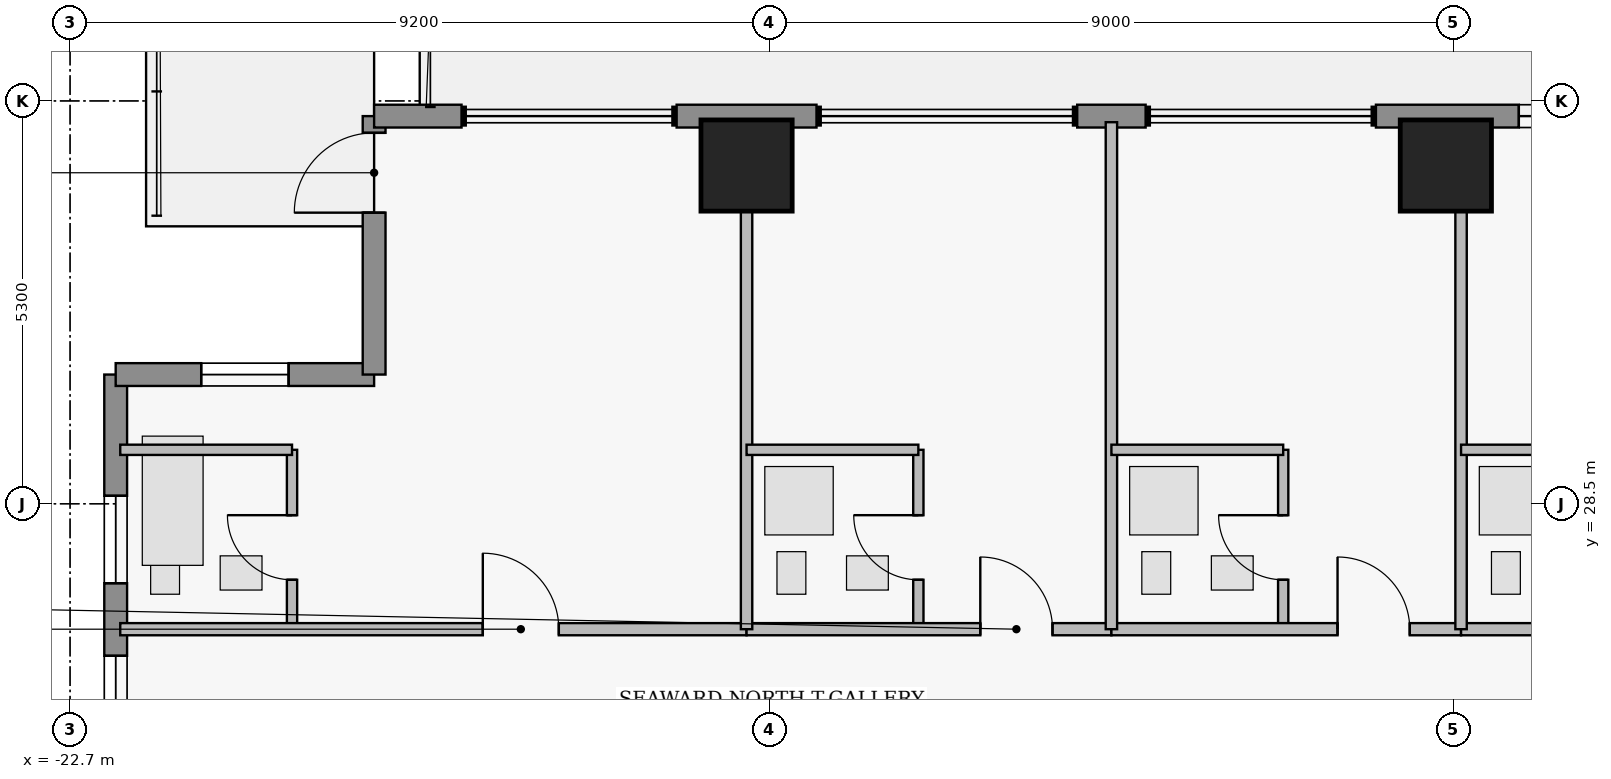
"""IFC4 building model, lengths in metres.
Left out: names, types, materials, properties, quantities, classifications, styles, units other than length and angle.
Written with IfcOpenShell. Run it as: python <this file> out.ifc"""

import sys

from ifc_helpers import new_model, si_unit, direction, frame, frame_2d, origin, origin_2d, place, context, subcontext, project, spatial, rectangle, extrude, element, fill, save


model = new_model("IFC4")
c1 = context("Model", 3, precision=1e-05, world=origin(), true_north=direction((0.0, 1.0)))
c2 = subcontext(c1, "Body", "Model", "MODEL_VIEW")
j1 = project(units=[si_unit("LENGTHUNIT", "METRE"), si_unit("PLANEANGLEUNIT", "RADIAN")], contexts=[c1])
p1 = place(None, origin())
s1 = spatial("IfcSite", under=j1, at=p1, CompositionType="ELEMENT")
p2 = place(p1, origin())
s2 = spatial("IfcBuilding", under=s1, at=p2, CompositionType="ELEMENT")
p3 = place(p2, frame((0.0, 0.0, 222.4)))
s3 = spatial("IfcBuildingStorey", under=s2, at=p3, CompositionType="ELEMENT", Elevation=222.4)
for number, where, z_axis, x_axis in (
    (1, (-13.8, 32.95, 0.0), (0.0, 0.0, 1.0), (1.0, 0.0, 0.0)),
    (2, (-4.6, 32.95, 0.0), (0.0, 0.0, 1.0), (1.0, 0.0, 0.0)),
):
    element("IfcColumn", number, at=place(p3, frame(where, z_axis=z_axis, x_axis=x_axis)), inside=s3, PredefinedType="COLUMN", context=c2, shape_type="SweptSolid", body=[
        extrude(rectangle(XDim=1.2, YDim=1.2, at=origin_2d()), origin(), (0.0, 0.0, 1.0), 3.75),
    ])
p4 = place(p3, frame((-22.1, 24.55, 0.0), z_axis=(0.0, 0.0, 1.0), x_axis=(0.0, 1.0, 0.0)))
e3 = element("IfcWall", 3, at=p4, inside=s3, PredefinedType="STANDARD", context=c2, shape_type="SweptSolid", body=[
    extrude(rectangle(XDim=5.65, YDim=0.3, at=frame_2d((2.825, 0.0))), origin(), (0.0, 0.0, 1.0), 3.53),
])
p5 = place(p4, frame((0.8, 0.0, 0.95)))
e4 = element("IfcOpeningElement", 4, at=p5, cuts=e3, PredefinedType="OPENING", context=c2, shape_type="SweptSolid", body=[
    extrude(rectangle(XDim=1.15, YDim=1.55, at=frame_2d((0.575, 0.775))), frame((0.0, 0.16, 0.0), z_axis=(0.0, -1.0, 0.0), x_axis=(1.0, 0.0, 0.0)), (0.0, 0.0, 1.0), 0.32),
])
p6 = place(p4, frame((2.905, 0.0, 0.95)))
e5 = element("IfcOpeningElement", 5, at=p6, cuts=e3, PredefinedType="OPENING", context=c2, shape_type="SweptSolid", body=[
    extrude(rectangle(XDim=1.15, YDim=1.55, at=frame_2d((0.575, 0.775))), frame((0.0, 0.16, 0.0), z_axis=(0.0, -1.0, 0.0), x_axis=(1.0, 0.0, 0.0)), (0.0, 0.0, 1.0), 0.32),
])
p7 = place(p3, frame((-22.1, 30.2, 0.0), z_axis=(0.0, 0.0, 1.0), x_axis=(1.0, 0.0, 0.0)))
e6 = element("IfcWall", 6, at=p7, inside=s3, PredefinedType="STANDARD", context=c2, shape_type="SweptSolid", body=[
    extrude(rectangle(XDim=3.4, YDim=0.3, at=frame_2d((1.7, 0.0))), origin(), (0.0, 0.0, 1.0), 3.53),
])
p8 = place(p7, frame((1.125, 0.0, 1.25)))
e7 = element("IfcOpeningElement", 7, at=p8, cuts=e6, PredefinedType="OPENING", context=c2, shape_type="SweptSolid", body=[
    extrude(rectangle(XDim=1.15, YDim=1.55, at=frame_2d((0.575, 0.775))), frame((0.0, 0.16, 0.0), z_axis=(0.0, -1.0, 0.0), x_axis=(1.0, 0.0, 0.0)), (0.0, 0.0, 1.0), 0.32),
])
p9 = place(p3, frame((-18.7, 30.2, 0.0), z_axis=(0.0, 0.0, 1.0), x_axis=(0.0, 1.0, 0.0)))
e8 = element("IfcWall", 8, at=p9, inside=s3, PredefinedType="STANDARD", context=c2, shape_type="SweptSolid", body=[
    extrude(rectangle(XDim=3.4, YDim=0.3, at=frame_2d((1.7, 0.0))), origin(), (0.0, 0.0, 1.0), 3.53),
])
p10 = place(p9, frame((2.13, 0.0, 0.0)))
e9 = element("IfcOpeningElement", 9, at=p10, cuts=e8, PredefinedType="OPENING", context=c2, shape_type="SweptSolid", body=[
    extrude(rectangle(XDim=1.05, YDim=2.2, at=frame_2d((0.525, 1.1))), frame((0.0, 0.16, 0.0), z_axis=(0.0, -1.0, 0.0), x_axis=(1.0, 0.0, 0.0)), (0.0, 0.0, 1.0), 0.32),
])
p11 = place(p3, frame((-18.7, 33.6, 0.0), z_axis=(0.0, 0.0, 1.0), x_axis=(1.0, 0.0, 0.0)))
e10 = element("IfcWall", 10, at=p11, inside=s3, PredefinedType="STANDARD", context=c2, shape_type="SweptSolid", body=[
    extrude(rectangle(XDim=1.15, YDim=0.3, at=frame_2d((0.575, 0.0))), origin(), (0.0, 0.0, 1.0), 3.53),
])
p12 = place(p3, frame((-14.72, 33.6, 0.0), z_axis=(0.0, 0.0, 1.0), x_axis=(1.0, 0.0, 0.0)))
e11 = element("IfcWall", 11, at=p12, inside=s3, PredefinedType="STANDARD", context=c2, shape_type="SweptSolid", body=[
    extrude(rectangle(XDim=1.84, YDim=0.3, at=frame_2d((0.92, 0.0))), origin(), (0.0, 0.0, 1.0), 3.53),
])
p13 = place(p3, frame((-9.45, 33.6, 0.0), z_axis=(0.0, 0.0, 1.0), x_axis=(1.0, 0.0, 0.0)))
e12 = element("IfcWall", 12, at=p13, inside=s3, PredefinedType="STANDARD", context=c2, shape_type="SweptSolid", body=[
    extrude(rectangle(XDim=0.9, YDim=0.3, at=frame_2d((0.45, 0.0))), origin(), (0.0, 0.0, 1.0), 3.53),
])
p14 = place(p3, frame((-5.52, 33.6, 0.0), z_axis=(0.0, 0.0, 1.0), x_axis=(1.0, 0.0, 0.0)))
e13 = element("IfcWall", 13, at=p14, inside=s3, PredefinedType="STANDARD", context=c2, shape_type="SweptSolid", body=[
    extrude(rectangle(XDim=6.17, YDim=0.3, at=frame_2d((3.085, 0.0))), origin(), (0.0, 0.0, 1.0), 3.53),
])
p15 = place(p14, frame((3.54, 0.0, 0.85)))
e14 = element("IfcOpeningElement", 14, at=p15, cuts=e13, PredefinedType="OPENING", context=c2, shape_type="SweptSolid", body=[
    extrude(rectangle(XDim=1.6, YDim=1.8, at=frame_2d((0.8, 0.9))), frame((0.0, 0.16, 0.0), z_axis=(0.0, -1.0, 0.0), x_axis=(1.0, 0.0, 0.0)), (0.0, 0.0, 1.0), 0.32),
])
p16 = place(p14, frame((1.88, 0.0, 0.95)))
e15 = element("IfcOpeningElement", 15, at=p16, cuts=e13, PredefinedType="OPENING", context=c2, shape_type="SweptSolid", body=[
    extrude(rectangle(XDim=1.15, YDim=1.55, at=frame_2d((0.575, 0.775))), frame((0.0, 0.16, 0.0), z_axis=(0.0, -1.0, 0.0), x_axis=(1.0, 0.0, 0.0)), (0.0, 0.0, 1.0), 0.32),
])
p17 = place(p3, frame((-19.78, 26.85, 0.0), z_axis=(0.0, 0.0, 1.0), x_axis=(0.0, 1.0, 0.0)))
e16 = element("IfcWall", 16, at=p17, inside=s3, PredefinedType="PLUMBINGWALL", context=c2, shape_type="SweptSolid", body=[
    extrude(rectangle(XDim=2.36, YDim=0.135, at=frame_2d((1.18, 0.0))), origin(), (0.0, 0.0, 1.0), 3.53),
])
p18 = place(p17, frame((0.65, 0.0, 0.0)))
e17 = element("IfcOpeningElement", 17, at=p18, cuts=e16, PredefinedType="OPENING", context=c2, shape_type="SweptSolid", body=[
    extrude(rectangle(XDim=0.85, YDim=2.1, at=frame_2d((0.425, 1.05))), frame((0.0, 0.077, 0.0), z_axis=(0.0, -1.0, 0.0), x_axis=(1.0, 0.0, 0.0)), (0.0, 0.0, 1.0), 0.155),
])
p19 = place(p3, frame((-22.04, 26.85, 0.0), z_axis=(0.0, 0.0, 1.0), x_axis=(1.0, 0.0, 0.0)))
e18 = element("IfcWall", 18, at=p19, inside=s3, PredefinedType="PARTITIONING", context=c2, shape_type="SweptSolid", body=[
    extrude(rectangle(XDim=8.24, YDim=0.16, at=frame_2d((4.12, 0.0))), origin(), (0.0, 0.0, 1.0), 3.53),
])
p20 = place(p19, frame((4.77, 0.0, 0.0)))
e19 = element("IfcOpeningElement", 19, at=p20, cuts=e18, PredefinedType="OPENING", context=c2, shape_type="SweptSolid", body=[
    extrude(rectangle(XDim=1.0, YDim=2.15, at=frame_2d((0.5, 1.075))), frame((0.0, 0.09, 0.0), z_axis=(0.0, -1.0, 0.0), x_axis=(1.0, 0.0, 0.0)), (0.0, 0.0, 1.0), 0.18),
])
p21 = place(p3, frame((-11.54, 26.85, 0.0), z_axis=(0.0, 0.0, 1.0), x_axis=(0.0, 1.0, 0.0)))
e20 = element("IfcWall", 20, at=p21, inside=s3, PredefinedType="PLUMBINGWALL", context=c2, shape_type="SweptSolid", body=[
    extrude(rectangle(XDim=2.36, YDim=0.135, at=frame_2d((1.18, 0.0))), origin(), (0.0, 0.0, 1.0), 3.53),
])
p22 = place(p21, frame((0.65, 0.0, 0.0)))
e21 = element("IfcOpeningElement", 21, at=p22, cuts=e20, PredefinedType="OPENING", context=c2, shape_type="SweptSolid", body=[
    extrude(rectangle(XDim=0.85, YDim=2.1, at=frame_2d((0.425, 1.05))), frame((0.0, 0.077, 0.0), z_axis=(0.0, -1.0, 0.0), x_axis=(1.0, 0.0, 0.0)), (0.0, 0.0, 1.0), 0.155),
])
p23 = place(p3, frame((-13.8, 26.85, 0.0), z_axis=(0.0, 0.0, 1.0), x_axis=(1.0, 0.0, 0.0)))
e22 = element("IfcWall", 22, at=p23, inside=s3, PredefinedType="PARTITIONING", context=c2, shape_type="SweptSolid", body=[
    extrude(rectangle(XDim=4.8, YDim=0.16, at=frame_2d((2.4, 0.0))), origin(), (0.0, 0.0, 1.0), 3.53),
])
p24 = place(p23, frame((3.075, 0.0, 0.0)))
e23 = element("IfcOpeningElement", 23, at=p24, cuts=e22, PredefinedType="OPENING", context=c2, shape_type="SweptSolid", body=[
    extrude(rectangle(XDim=0.95, YDim=2.15, at=frame_2d((0.475, 1.075))), frame((0.0, 0.09, 0.0), z_axis=(0.0, -1.0, 0.0), x_axis=(1.0, 0.0, 0.0)), (0.0, 0.0, 1.0), 0.18),
])
p25 = place(p3, frame((-6.74, 26.85, 0.0), z_axis=(0.0, 0.0, 1.0), x_axis=(0.0, 1.0, 0.0)))
e24 = element("IfcWall", 24, at=p25, inside=s3, PredefinedType="PLUMBINGWALL", context=c2, shape_type="SweptSolid", body=[
    extrude(rectangle(XDim=2.36, YDim=0.135, at=frame_2d((1.18, 0.0))), origin(), (0.0, 0.0, 1.0), 3.53),
])
p26 = place(p25, frame((0.65, 0.0, 0.0)))
e25 = element("IfcOpeningElement", 25, at=p26, cuts=e24, PredefinedType="OPENING", context=c2, shape_type="SweptSolid", body=[
    extrude(rectangle(XDim=0.85, YDim=2.1, at=frame_2d((0.425, 1.05))), frame((0.0, 0.077, 0.0), z_axis=(0.0, -1.0, 0.0), x_axis=(1.0, 0.0, 0.0)), (0.0, 0.0, 1.0), 0.155),
])
p27 = place(p3, frame((-9.0, 26.85, 0.0), z_axis=(0.0, 0.0, 1.0), x_axis=(1.0, 0.0, 0.0)))
e26 = element("IfcWall", 26, at=p27, inside=s3, PredefinedType="PARTITIONING", context=c2, shape_type="SweptSolid", body=[
    extrude(rectangle(XDim=4.6, YDim=0.16, at=frame_2d((2.3, 0.0))), origin(), (0.0, 0.0, 1.0), 3.53),
])
p28 = place(p27, frame((2.975, 0.0, 0.0)))
e27 = element("IfcOpeningElement", 27, at=p28, cuts=e26, PredefinedType="OPENING", context=c2, shape_type="SweptSolid", body=[
    extrude(rectangle(XDim=0.95, YDim=2.15, at=frame_2d((0.475, 1.075))), frame((0.0, 0.09, 0.0), z_axis=(0.0, -1.0, 0.0), x_axis=(1.0, 0.0, 0.0)), (0.0, 0.0, 1.0), 0.18),
])
p29 = place(p3, frame((-4.4, 26.85, 0.0), z_axis=(0.0, 0.0, 1.0), x_axis=(1.0, 0.0, 0.0)))
e28 = element("IfcWall", 28, at=p29, inside=s3, PredefinedType="PARTITIONING", context=c2, shape_type="SweptSolid", body=[
    extrude(rectangle(XDim=4.6, YDim=0.16, at=frame_2d((2.3, 0.0))), origin(), (0.0, 0.0, 1.0), 3.53),
])
p30 = place(p29, frame((2.975, 0.0, 0.0)))
e29 = element("IfcOpeningElement", 29, at=p30, cuts=e28, PredefinedType="OPENING", context=c2, shape_type="SweptSolid", body=[
    extrude(rectangle(XDim=0.95, YDim=2.15, at=frame_2d((0.475, 1.075))), frame((0.0, 0.09, 0.0), z_axis=(0.0, -1.0, 0.0), x_axis=(1.0, 0.0, 0.0)), (0.0, 0.0, 1.0), 0.18),
])
p31 = place(p3, frame((-22.04, 29.21, 0.0), z_axis=(0.0, 0.0, 1.0), x_axis=(1.0, 0.0, 0.0)))
e30 = element("IfcWall", 30, at=p31, inside=s3, PredefinedType="PLUMBINGWALL", context=c2, shape_type="SweptSolid", body=[
    extrude(rectangle(XDim=2.26, YDim=0.135, at=frame_2d((1.13, 0.0))), origin(), (0.0, 0.0, 1.0), 3.53),
])
p32 = place(p3, frame((-13.8, 26.85, 0.0), z_axis=(0.0, 0.0, 1.0), x_axis=(0.0, 1.0, 0.0)))
e31 = element("IfcWall", 31, at=p32, inside=s3, PredefinedType="PARTITIONING", context=c2, shape_type="SweptSolid", body=[
    extrude(rectangle(XDim=6.67, YDim=0.15, at=frame_2d((3.335, 0.0))), origin(), (0.0, 0.0, 1.0), 2.519),
])
p33 = place(p3, frame((-13.8, 29.21, 0.0), z_axis=(0.0, 0.0, 1.0), x_axis=(1.0, 0.0, 0.0)))
e32 = element("IfcWall", 32, at=p33, inside=s3, PredefinedType="PLUMBINGWALL", context=c2, shape_type="SweptSolid", body=[
    extrude(rectangle(XDim=2.26, YDim=0.135, at=frame_2d((1.13, 0.0))), origin(), (0.0, 0.0, 1.0), 3.53),
])
p34 = place(p3, frame((-9.0, 26.85, 0.0), z_axis=(0.0, 0.0, 1.0), x_axis=(0.0, 1.0, 0.0)))
e33 = element("IfcWall", 33, at=p34, inside=s3, PredefinedType="PARTITIONING", context=c2, shape_type="SweptSolid", body=[
    extrude(rectangle(XDim=6.67, YDim=0.15, at=frame_2d((3.335, 0.0))), origin(), (0.0, 0.0, 1.0), 3.53),
])
p35 = place(p3, frame((-9.0, 29.21, 0.0), z_axis=(0.0, 0.0, 1.0), x_axis=(1.0, 0.0, 0.0)))
e34 = element("IfcWall", 34, at=p35, inside=s3, PredefinedType="PLUMBINGWALL", context=c2, shape_type="SweptSolid", body=[
    extrude(rectangle(XDim=2.26, YDim=0.135, at=frame_2d((1.13, 0.0))), origin(), (0.0, 0.0, 1.0), 3.53),
])
p36 = place(p3, frame((-4.4, 26.85, 0.0), z_axis=(0.0, 0.0, 1.0), x_axis=(0.0, 1.0, 0.0)))
e35 = element("IfcWall", 35, at=p36, inside=s3, PredefinedType="PARTITIONING", context=c2, shape_type="SweptSolid", body=[
    extrude(rectangle(XDim=6.67, YDim=0.15, at=frame_2d((3.335, 0.0))), origin(), (0.0, 0.0, 1.0), 2.519),
])
p37 = place(p3, frame((-4.4, 29.21, 0.0), z_axis=(0.0, 0.0, 1.0), x_axis=(1.0, 0.0, 0.0)))
e36 = element("IfcWall", 36, at=p37, inside=s3, PredefinedType="PLUMBINGWALL", context=c2, shape_type="SweptSolid", body=[
    extrude(rectangle(XDim=2.26, YDim=0.135, at=frame_2d((1.13, 0.0))), origin(), (0.0, 0.0, 1.0), 3.53),
])
p38 = place(p5, origin())
e37 = element("IfcWindow", 37, at=p38, inside=s3, PartitioningType="SINGLE_PANEL", PredefinedType="WINDOW", context=c2, shape_type="SweptSolid", body=[
    extrude(rectangle(XDim=1.15, YDim=1.55, at=frame_2d((0.575, 0.775))), frame((0.0, 0.03, 0.0), z_axis=(0.0, -1.0, 0.0), x_axis=(1.0, 0.0, 0.0)), (0.0, 0.0, 1.0), 0.06),
])
fill(e4, e37)
p39 = place(p6, origin())
e38 = element("IfcWindow", 38, at=p39, inside=s3, PartitioningType="SINGLE_PANEL", PredefinedType="WINDOW", context=c2, shape_type="SweptSolid", body=[
    extrude(rectangle(XDim=1.15, YDim=1.55, at=frame_2d((0.575, 0.775))), frame((0.0, 0.03, 0.0), z_axis=(0.0, -1.0, 0.0), x_axis=(1.0, 0.0, 0.0)), (0.0, 0.0, 1.0), 0.06),
])
fill(e5, e38)
p40 = place(p8, origin())
e39 = element("IfcWindow", 39, at=p40, inside=s3, PartitioningType="SINGLE_PANEL", PredefinedType="WINDOW", context=c2, shape_type="SweptSolid", body=[
    extrude(rectangle(XDim=1.15, YDim=1.55, at=frame_2d((0.575, 0.775))), frame((0.0, 0.03, 0.0), z_axis=(0.0, -1.0, 0.0), x_axis=(1.0, 0.0, 0.0)), (0.0, 0.0, 1.0), 0.06),
])
fill(e7, e39)
p41 = place(p10, origin())
e40 = element("IfcDoor", 40, at=p41, inside=s3, OperationType="SINGLE_SWING_LEFT", PredefinedType="DOOR", context=c2, shape_type="SweptSolid", body=[
    extrude(rectangle(XDim=1.05, YDim=2.2, at=frame_2d((0.525, 1.1))), frame((0.0, 0.025, 0.0), z_axis=(0.0, -1.0, 0.0), x_axis=(1.0, 0.0, 0.0)), (0.0, 0.0, 1.0), 0.05),
])
fill(e9, e40)
p42 = place(p16, origin())
e41 = element("IfcWindow", 41, at=p42, inside=s3, PartitioningType="SINGLE_PANEL", PredefinedType="WINDOW", context=c2, shape_type="SweptSolid", body=[
    extrude(rectangle(XDim=1.15, YDim=1.55, at=frame_2d((0.575, 0.775))), frame((0.0, 0.03, 0.0), z_axis=(0.0, -1.0, 0.0), x_axis=(1.0, 0.0, 0.0)), (0.0, 0.0, 1.0), 0.06),
])
fill(e15, e41)
p43 = place(p18, origin())
e42 = element("IfcDoor", 42, at=p43, inside=s3, OperationType="SINGLE_SWING_RIGHT", PredefinedType="DOOR", context=c2, shape_type="SweptSolid", body=[
    extrude(rectangle(XDim=0.85, YDim=2.1, at=frame_2d((0.425, 1.05))), frame((0.0, 0.025, 0.0), z_axis=(0.0, -1.0, 0.0), x_axis=(1.0, 0.0, 0.0)), (0.0, 0.0, 1.0), 0.05),
])
fill(e17, e42)
p44 = place(p20, origin())
e43 = element("IfcDoor", 43, at=p44, inside=s3, OperationType="SINGLE_SWING_LEFT", PredefinedType="DOOR", context=c2, shape_type="SweptSolid", body=[
    extrude(rectangle(XDim=1.0, YDim=2.15, at=frame_2d((0.5, 1.075))), frame((0.0, 0.025, 0.0), z_axis=(0.0, -1.0, 0.0), x_axis=(1.0, 0.0, 0.0)), (0.0, 0.0, 1.0), 0.05),
])
fill(e19, e43)
p45 = place(p22, origin())
e44 = element("IfcDoor", 44, at=p45, inside=s3, OperationType="SINGLE_SWING_RIGHT", PredefinedType="DOOR", context=c2, shape_type="SweptSolid", body=[
    extrude(rectangle(XDim=0.85, YDim=2.1, at=frame_2d((0.425, 1.05))), frame((0.0, 0.025, 0.0), z_axis=(0.0, -1.0, 0.0), x_axis=(1.0, 0.0, 0.0)), (0.0, 0.0, 1.0), 0.05),
])
fill(e21, e44)
p46 = place(p24, origin())
e45 = element("IfcDoor", 45, at=p46, inside=s3, OperationType="SINGLE_SWING_LEFT", PredefinedType="DOOR", context=c2, shape_type="SweptSolid", body=[
    extrude(rectangle(XDim=0.95, YDim=2.15, at=frame_2d((0.475, 1.075))), frame((0.0, 0.025, 0.0), z_axis=(0.0, -1.0, 0.0), x_axis=(1.0, 0.0, 0.0)), (0.0, 0.0, 1.0), 0.05),
])
fill(e23, e45)
p47 = place(p26, origin())
e46 = element("IfcDoor", 46, at=p47, inside=s3, OperationType="SINGLE_SWING_RIGHT", PredefinedType="DOOR", context=c2, shape_type="SweptSolid", body=[
    extrude(rectangle(XDim=0.85, YDim=2.1, at=frame_2d((0.425, 1.05))), frame((0.0, 0.025, 0.0), z_axis=(0.0, -1.0, 0.0), x_axis=(1.0, 0.0, 0.0)), (0.0, 0.0, 1.0), 0.05),
])
fill(e25, e46)
p48 = place(p28, origin())
e47 = element("IfcDoor", 47, at=p48, inside=s3, OperationType="SINGLE_SWING_LEFT", PredefinedType="DOOR", context=c2, shape_type="SweptSolid", body=[
    extrude(rectangle(XDim=0.95, YDim=2.15, at=frame_2d((0.475, 1.075))), frame((0.0, 0.025, 0.0), z_axis=(0.0, -1.0, 0.0), x_axis=(1.0, 0.0, 0.0)), (0.0, 0.0, 1.0), 0.05),
])
fill(e27, e47)
save(model, sys.argv[1])
